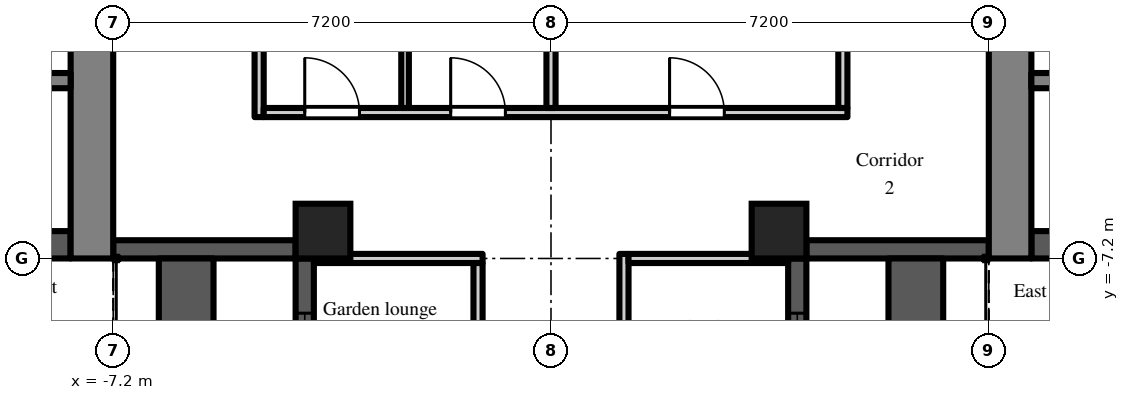
"""IFC4 building model, lengths in metres.
Left out: names, types, materials, properties, quantities, classifications, styles, units other than length and angle.
Written with IfcOpenShell. Run it as: python <this file> out.ifc"""

import sys

from ifc_helpers import new_model, si_unit, direction, frame, frame_2d, origin, origin_2d, place, context, subcontext, project, spatial, rectangle, extrude, element, fill, save


model = new_model("IFC4")
c1 = context("Model", 3, precision=1e-05, world=origin(), true_north=direction((0.0, 1.0)))
c2 = subcontext(c1, "Body", "Model", "MODEL_VIEW")
j1 = project(units=[si_unit("LENGTHUNIT", "METRE"), si_unit("PLANEANGLEUNIT", "RADIAN")], contexts=[c1])
p1 = place(None, origin())
s1 = spatial("IfcSite", under=j1, at=p1, CompositionType="ELEMENT")
p2 = place(p1, origin())
s2 = spatial("IfcBuilding", under=s1, at=p2, CompositionType="ELEMENT")
p3 = place(p2, frame((0.0, 0.0, 156.3)))
s3 = spatial("IfcBuildingStorey", under=s2, at=p3, CompositionType="ELEMENT", Elevation=156.3)
for number, where, z_axis, x_axis in (
    (1, (-3.75, -6.75, 0.0), (0.0, 0.0, 1.0), (1.0, 0.0, 0.0)),
    (2, (3.75, -6.75, 0.0), (0.0, 0.0, 1.0), (1.0, 0.0, 0.0)),
):
    element("IfcColumn", number, at=place(p3, frame(where, z_axis=z_axis, x_axis=x_axis)), inside=s3, PredefinedType="COLUMN", context=c2, shape_type="SweptSolid", body=[
        extrude(rectangle(XDim=0.9, YDim=0.9, at=origin_2d()), origin(), (0.0, 0.0, 1.0), 3.0),
    ])
p4 = place(p3, frame((-7.2, -7.05, 0.0), z_axis=(0.0, 0.0, 1.0), x_axis=(1.0, 0.0, 0.0)))
e3 = element("IfcWall", 3, at=p4, inside=s3, PredefinedType="SOLIDWALL", context=c2, shape_type="SweptSolid", body=[
    extrude(rectangle(XDim=3.0, YDim=0.3, at=frame_2d((1.5, 0.0))), origin(), (0.0, 0.0, 1.0), 2.2),
])
p5 = place(p3, frame((-4.05, -7.2, 0.0), z_axis=(0.0, 0.0, 1.0), x_axis=(0.0, -1.0, 0.0)))
e4 = element("IfcWall", 4, at=p5, inside=s3, PredefinedType="SOLIDWALL", context=c2, shape_type="SweptSolid", body=[
    extrude(rectangle(XDim=7.2, YDim=0.3, at=frame_2d((3.6, 0.0))), origin(), (0.0, 0.0, 1.0), 2.2),
])
p6 = place(p5, frame((3.0, 0.0, 0.0)))
e5 = element("IfcOpeningElement", 5, at=p6, cuts=e4, PredefinedType="OPENING", context=c2, shape_type="SweptSolid", body=[
    extrude(rectangle(XDim=1.2, YDim=2.05, at=frame_2d((0.6, 1.025))), frame((0.0, 0.16, 0.0), z_axis=(0.0, -1.0, 0.0), x_axis=(1.0, 0.0, 0.0)), (0.0, 0.0, 1.0), 0.32),
])
p7 = place(p5, frame((0.9, 0.0, 0.2)))
e6 = element("IfcOpeningElement", 6, at=p7, cuts=e4, PredefinedType="OPENING", context=c2, shape_type="SweptSolid", body=[
    extrude(rectangle(XDim=1.8, YDim=1.85, at=frame_2d((0.9, 0.925))), frame((0.0, 0.16, 0.0), z_axis=(0.0, -1.0, 0.0), x_axis=(1.0, 0.0, 0.0)), (0.0, 0.0, 1.0), 0.32),
])
p8 = place(p5, frame((4.5, 0.0, 0.2)))
e7 = element("IfcOpeningElement", 7, at=p8, cuts=e4, PredefinedType="OPENING", context=c2, shape_type="SweptSolid", body=[
    extrude(rectangle(XDim=1.8, YDim=1.85, at=frame_2d((0.9, 0.925))), frame((0.0, 0.16, 0.0), z_axis=(0.0, -1.0, 0.0), x_axis=(1.0, 0.0, 0.0)), (0.0, 0.0, 1.0), 0.32),
])
p9 = place(p3, frame((4.05, -14.4, 0.0), z_axis=(0.0, 0.0, 1.0), x_axis=(0.0, 1.0, 0.0)))
e8 = element("IfcWall", 8, at=p9, inside=s3, PredefinedType="SOLIDWALL", context=c2, shape_type="SweptSolid", body=[
    extrude(rectangle(XDim=7.2, YDim=0.3, at=frame_2d((3.6, 0.0))), origin(), (0.0, 0.0, 1.0), 2.2),
])
p10 = place(p9, frame((3.0, 0.0, 0.0)))
e9 = element("IfcOpeningElement", 9, at=p10, cuts=e8, PredefinedType="OPENING", context=c2, shape_type="SweptSolid", body=[
    extrude(rectangle(XDim=1.2, YDim=2.05, at=frame_2d((0.6, 1.025))), frame((0.0, 0.16, 0.0), z_axis=(0.0, -1.0, 0.0), x_axis=(1.0, 0.0, 0.0)), (0.0, 0.0, 1.0), 0.32),
])
p11 = place(p9, frame((0.9, 0.0, 0.2)))
e10 = element("IfcOpeningElement", 10, at=p11, cuts=e8, PredefinedType="OPENING", context=c2, shape_type="SweptSolid", body=[
    extrude(rectangle(XDim=1.8, YDim=1.85, at=frame_2d((0.9, 0.925))), frame((0.0, 0.16, 0.0), z_axis=(0.0, -1.0, 0.0), x_axis=(1.0, 0.0, 0.0)), (0.0, 0.0, 1.0), 0.32),
])
p12 = place(p9, frame((4.5, 0.0, 0.2)))
e11 = element("IfcOpeningElement", 11, at=p12, cuts=e8, PredefinedType="OPENING", context=c2, shape_type="SweptSolid", body=[
    extrude(rectangle(XDim=1.8, YDim=1.85, at=frame_2d((0.9, 0.925))), frame((0.0, 0.16, 0.0), z_axis=(0.0, -1.0, 0.0), x_axis=(1.0, 0.0, 0.0)), (0.0, 0.0, 1.0), 0.32),
])
p13 = place(p3, frame((4.2, -7.05, 0.0), z_axis=(0.0, 0.0, 1.0), x_axis=(1.0, 0.0, 0.0)))
e12 = element("IfcWall", 12, at=p13, inside=s3, PredefinedType="SOLIDWALL", context=c2, shape_type="SweptSolid", body=[
    extrude(rectangle(XDim=3.0, YDim=0.3, at=frame_2d((1.5, 0.0))), origin(), (0.0, 0.0, 1.0), 2.2),
])
for number, where, z_axis, x_axis in (
    (13, (6.0, -14.4, 0.0), (0.0, 0.0, 1.0), (0.0, 1.0, 0.0)),
    (14, (-6.0, -14.4, 0.0), (0.0, 0.0, 1.0), (0.0, 1.0, 0.0)),
):
    element("IfcWall", number, at=place(p3, frame(where, z_axis=z_axis, x_axis=x_axis)), inside=s3, PredefinedType="PARAPET", context=c2, shape_type="SweptSolid", body=[
        extrude(rectangle(XDim=7.2, YDim=0.9, at=frame_2d((3.6, 0.0))), origin(), (0.0, 0.0, 1.0), 0.8),
    ])
p14 = place(p3, frame((7.55, -7.2, 0.0), z_axis=(0.0, 0.0, 1.0), x_axis=(0.0, 1.0, 0.0)))
e15 = element("IfcWall", 15, at=p14, inside=s3, PredefinedType="SHEAR", context=c2, shape_type="SweptSolid", body=[
    extrude(rectangle(XDim=14.4, YDim=0.7, at=frame_2d((7.2, 0.0))), origin(), (0.0, 0.0, 1.0), 2.6),
])
p15 = place(p14, frame((6.0, 0.0, 0.0)))
e16 = element("IfcOpeningElement", 16, at=p15, cuts=e15, PredefinedType="OPENING", context=c2, shape_type="SweptSolid", body=[
    extrude(rectangle(XDim=2.4, YDim=2.2, at=frame_2d((1.2, 1.1))), frame((0.0, 0.36, 0.0), z_axis=(0.0, -1.0, 0.0), x_axis=(1.0, 0.0, 0.0)), (0.0, 0.0, 1.0), 0.72),
])
p16 = place(p3, frame((7.9, -6.975, 0.0), z_axis=(0.0, 0.0, 1.0), x_axis=(1.0, 0.0, 0.0)))
e17 = element("IfcWall", 17, at=p16, inside=s3, PredefinedType="SHEAR", context=c2, shape_type="SweptSolid", body=[
    extrude(rectangle(XDim=12.95, YDim=0.45, at=frame_2d((6.475, 0.0))), origin(), (0.0, 0.0, 1.0), 2.6),
])
p17 = place(p3, frame((7.9, -4.275, 0.0), z_axis=(0.0, 0.0, 1.0), x_axis=(1.0, 0.0, 0.0)))
e18 = element("IfcWall", 18, at=p17, inside=s3, PredefinedType="SHEAR", context=c2, shape_type="SweptSolid", body=[
    extrude(rectangle(XDim=1.95, YDim=0.25, at=frame_2d((0.975, 0.0))), origin(), (0.0, 0.0, 1.0), 2.6),
])
p18 = place(p3, frame((-7.55, -7.2, 0.0), z_axis=(0.0, 0.0, 1.0), x_axis=(0.0, 1.0, 0.0)))
e19 = element("IfcWall", 19, at=p18, inside=s3, PredefinedType="SHEAR", context=c2, shape_type="SweptSolid", body=[
    extrude(rectangle(XDim=14.4, YDim=0.7, at=frame_2d((7.2, 0.0))), origin(), (0.0, 0.0, 1.0), 2.6),
])
p19 = place(p18, frame((6.0, 0.0, 0.0)))
e20 = element("IfcOpeningElement", 20, at=p19, cuts=e19, PredefinedType="OPENING", context=c2, shape_type="SweptSolid", body=[
    extrude(rectangle(XDim=2.4, YDim=2.2, at=frame_2d((1.2, 1.1))), frame((0.0, 0.36, 0.0), z_axis=(0.0, -1.0, 0.0), x_axis=(1.0, 0.0, 0.0)), (0.0, 0.0, 1.0), 0.72),
])
p20 = place(p3, frame((-7.9, -6.975, 0.0), z_axis=(0.0, 0.0, 1.0), x_axis=(-1.0, 0.0, 0.0)))
e21 = element("IfcWall", 21, at=p20, inside=s3, PredefinedType="SHEAR", context=c2, shape_type="SweptSolid", body=[
    extrude(rectangle(XDim=12.95, YDim=0.45, at=frame_2d((6.475, 0.0))), origin(), (0.0, 0.0, 1.0), 2.6),
])
p21 = place(p3, frame((-7.9, -4.275, 0.0), z_axis=(0.0, 0.0, 1.0), x_axis=(-1.0, 0.0, 0.0)))
e22 = element("IfcWall", 22, at=p21, inside=s3, PredefinedType="SHEAR", context=c2, shape_type="SweptSolid", body=[
    extrude(rectangle(XDim=1.95, YDim=0.25, at=frame_2d((0.975, 0.0))), origin(), (0.0, 0.0, 1.0), 2.6),
])
p22 = place(p3, frame((-4.8, -4.875, 0.0), z_axis=(0.0, 0.0, 1.0), x_axis=(0.0, 1.0, 0.0)))
e23 = element("IfcWall", 23, at=p22, inside=s3, PredefinedType="PARTITIONING", context=c2, shape_type="SweptSolid", body=[
    extrude(rectangle(XDim=9.75, YDim=0.15, at=frame_2d((4.875, 0.0))), origin(), (0.0, 0.0, 1.0), 2.6),
])
p23 = place(p22, frame((5.575, 0.0, 0.0)))
e24 = element("IfcOpeningElement", 24, at=p23, cuts=e23, PredefinedType="OPENING", context=c2, shape_type="SweptSolid", body=[
    extrude(rectangle(XDim=1.0, YDim=2.1, at=frame_2d((0.5, 1.05))), frame((0.0, 0.085, 0.0), z_axis=(0.0, -1.0, 0.0), x_axis=(1.0, 0.0, 0.0)), (0.0, 0.0, 1.0), 0.17),
])
p24 = place(p3, frame((-4.725, -4.8, 0.0), z_axis=(0.0, 0.0, 1.0), x_axis=(1.0, 0.0, 0.0)))
e25 = element("IfcWall", 25, at=p24, inside=s3, PredefinedType="PARTITIONING", context=c2, shape_type="SweptSolid", body=[
    extrude(rectangle(XDim=9.6, YDim=0.15, at=frame_2d((4.8, 0.0))), origin(), (0.0, 0.0, 1.0), 2.6),
])
p25 = place(p24, frame((0.675, 0.0, 0.0)))
e26 = element("IfcOpeningElement", 26, at=p25, cuts=e25, PredefinedType="OPENING", context=c2, shape_type="SweptSolid", body=[
    extrude(rectangle(XDim=0.9, YDim=2.1, at=frame_2d((0.45, 1.05))), frame((0.0, 0.085, 0.0), z_axis=(0.0, -1.0, 0.0), x_axis=(1.0, 0.0, 0.0)), (0.0, 0.0, 1.0), 0.17),
])
p26 = place(p24, frame((3.075, 0.0, 0.0)))
e27 = element("IfcOpeningElement", 27, at=p26, cuts=e25, PredefinedType="OPENING", context=c2, shape_type="SweptSolid", body=[
    extrude(rectangle(XDim=0.9, YDim=2.1, at=frame_2d((0.45, 1.05))), frame((0.0, 0.085, 0.0), z_axis=(0.0, -1.0, 0.0), x_axis=(1.0, 0.0, 0.0)), (0.0, 0.0, 1.0), 0.17),
])
p27 = place(p24, frame((6.675, 0.0, 0.0)))
e28 = element("IfcOpeningElement", 28, at=p27, cuts=e25, PredefinedType="OPENING", context=c2, shape_type="SweptSolid", body=[
    extrude(rectangle(XDim=0.9, YDim=2.1, at=frame_2d((0.45, 1.05))), frame((0.0, 0.085, 0.0), z_axis=(0.0, -1.0, 0.0), x_axis=(1.0, 0.0, 0.0)), (0.0, 0.0, 1.0), 0.17),
])
p28 = place(p3, frame((-3.9, -7.2, 0.0), z_axis=(0.0, 0.0, 1.0), x_axis=(1.0, 0.0, 0.0)))
e29 = element("IfcWall", 29, at=p28, inside=s3, PredefinedType="PARTITIONING", context=c2, shape_type="SweptSolid", body=[
    extrude(rectangle(XDim=2.775, YDim=0.15, at=frame_2d((1.387, 0.0))), origin(), (0.0, 0.0, 1.0), 2.6),
])
p29 = place(p3, frame((-2.4, -4.725, 0.0), z_axis=(0.0, 0.0, 1.0), x_axis=(0.0, 1.0, 0.0)))
e30 = element("IfcWall", 30, at=p29, inside=s3, PredefinedType="PARTITIONING", context=c2, shape_type="SweptSolid", body=[
    extrude(rectangle(XDim=2.263, YDim=0.125, at=frame_2d((1.131, 0.0))), origin(), (0.0, 0.0, 1.0), 2.6),
])
p30 = place(p3, frame((-1.2, -21.3, 0.0), z_axis=(0.0, 0.0, 1.0), x_axis=(0.0, 1.0, 0.0)))
e31 = element("IfcWall", 31, at=p30, inside=s3, PredefinedType="PARTITIONING", context=c2, shape_type="SweptSolid", body=[
    extrude(rectangle(XDim=14.025, YDim=0.15, at=frame_2d((7.013, 0.0))), origin(), (0.0, 0.0, 1.0), 2.6),
])
p31 = place(p30, frame((7.85, 0.0, 0.0)))
e32 = element("IfcOpeningElement", 32, at=p31, cuts=e31, PredefinedType="OPENING", context=c2, shape_type="SweptSolid", body=[
    extrude(rectangle(XDim=0.9, YDim=2.1, at=frame_2d((0.45, 1.05))), frame((0.0, 0.085, 0.0), z_axis=(0.0, -1.0, 0.0), x_axis=(1.0, 0.0, 0.0)), (0.0, 0.0, 1.0), 0.17),
])
p32 = place(p30, frame((11.45, 0.0, 0.0)))
e33 = element("IfcOpeningElement", 33, at=p32, cuts=e31, PredefinedType="OPENING", context=c2, shape_type="SweptSolid", body=[
    extrude(rectangle(XDim=0.9, YDim=2.1, at=frame_2d((0.45, 1.05))), frame((0.0, 0.085, 0.0), z_axis=(0.0, -1.0, 0.0), x_axis=(1.0, 0.0, 0.0)), (0.0, 0.0, 1.0), 0.17),
])
p33 = place(p30, frame((2.1, 0.0, 0.0)))
e34 = element("IfcOpeningElement", 34, at=p33, cuts=e31, PredefinedType="OPENING", context=c2, shape_type="SweptSolid", body=[
    extrude(rectangle(XDim=1.0, YDim=2.1, at=frame_2d((0.5, 1.05))), frame((0.0, 0.085, 0.0), z_axis=(0.0, -1.0, 0.0), x_axis=(1.0, 0.0, 0.0)), (0.0, 0.0, 1.0), 0.17),
])
p34 = place(p3, frame((0.0, -4.725, 0.0), z_axis=(0.0, 0.0, 1.0), x_axis=(0.0, 1.0, 0.0)))
e35 = element("IfcWall", 35, at=p34, inside=s3, PredefinedType="PARTITIONING", context=c2, shape_type="SweptSolid", body=[
    extrude(rectangle(XDim=2.25, YDim=0.15, at=frame_2d((1.125, 0.0))), origin(), (0.0, 0.0, 1.0), 2.6),
])
p35 = place(p3, frame((1.2, -21.3, 0.0), z_axis=(0.0, 0.0, 1.0), x_axis=(0.0, 1.0, 0.0)))
e36 = element("IfcWall", 36, at=p35, inside=s3, PredefinedType="PARTITIONING", context=c2, shape_type="SweptSolid", body=[
    extrude(rectangle(XDim=14.175, YDim=0.15, at=frame_2d((7.087, 0.0))), origin(), (0.0, 0.0, 1.0), 2.6),
])
p36 = place(p35, frame((8.25, 0.0, 0.0)))
e37 = element("IfcOpeningElement", 37, at=p36, cuts=e36, PredefinedType="OPENING", context=c2, shape_type="SweptSolid", body=[
    extrude(rectangle(XDim=0.9, YDim=2.1, at=frame_2d((0.45, 1.05))), frame((0.0, 0.085, 0.0), z_axis=(0.0, -1.0, 0.0), x_axis=(1.0, 0.0, 0.0)), (0.0, 0.0, 1.0), 0.17),
])
p37 = place(p35, frame((0.2, 0.0, 0.0)))
e38 = element("IfcOpeningElement", 38, at=p37, cuts=e36, PredefinedType="OPENING", context=c2, shape_type="SweptSolid", body=[
    extrude(rectangle(XDim=1.0, YDim=2.1, at=frame_2d((0.5, 1.05))), frame((0.0, 0.085, 0.0), z_axis=(0.0, -1.0, 0.0), x_axis=(1.0, 0.0, 0.0)), (0.0, 0.0, 1.0), 0.17),
])
p38 = place(p3, frame((1.275, -7.2, 0.0), z_axis=(0.0, 0.0, 1.0), x_axis=(1.0, 0.0, 0.0)))
e39 = element("IfcWall", 39, at=p38, inside=s3, PredefinedType="PARTITIONING", context=c2, shape_type="SweptSolid", body=[
    extrude(rectangle(XDim=2.625, YDim=0.15, at=frame_2d((1.312, 0.0))), origin(), (0.0, 0.0, 1.0), 2.6),
])
p39 = place(p3, frame((4.8, -4.725, 0.0), z_axis=(0.0, 0.0, 1.0), x_axis=(0.0, 1.0, 0.0)))
e40 = element("IfcWall", 40, at=p39, inside=s3, PredefinedType="PARTITIONING", context=c2, shape_type="SweptSolid", body=[
    extrude(rectangle(XDim=9.45, YDim=0.15, at=frame_2d((4.725, 0.0))), origin(), (0.0, 0.0, 1.0), 2.6),
])
p40 = place(p39, frame((5.025, 0.0, 0.0)))
e41 = element("IfcOpeningElement", 41, at=p40, cuts=e40, PredefinedType="OPENING", context=c2, shape_type="SweptSolid", body=[
    extrude(rectangle(XDim=1.8, YDim=2.1, at=frame_2d((0.9, 1.05))), frame((0.0, 0.085, 0.0), z_axis=(0.0, -1.0, 0.0), x_axis=(1.0, 0.0, 0.0)), (0.0, 0.0, 1.0), 0.17),
])
p41 = place(p7, origin())
e42 = element("IfcWindow", 42, at=p41, inside=s3, PartitioningType="SINGLE_PANEL", PredefinedType="WINDOW", context=c2, shape_type="SweptSolid", body=[
    extrude(rectangle(XDim=1.8, YDim=1.85, at=frame_2d((0.9, 0.925))), frame((0.0, 0.03, 0.0), z_axis=(0.0, -1.0, 0.0), x_axis=(1.0, 0.0, 0.0)), (0.0, 0.0, 1.0), 0.06),
])
fill(e6, e42)
p42 = place(p12, origin())
e43 = element("IfcWindow", 43, at=p42, inside=s3, PartitioningType="SINGLE_PANEL", PredefinedType="WINDOW", context=c2, shape_type="SweptSolid", body=[
    extrude(rectangle(XDim=1.8, YDim=1.85, at=frame_2d((0.9, 0.925))), frame((0.0, 0.03, 0.0), z_axis=(0.0, -1.0, 0.0), x_axis=(1.0, 0.0, 0.0)), (0.0, 0.0, 1.0), 0.06),
])
fill(e11, e43)
p43 = place(p25, origin())
e44 = element("IfcDoor", 44, at=p43, inside=s3, OperationType="SINGLE_SWING_LEFT", PredefinedType="DOOR", context=c2, shape_type="SweptSolid", body=[
    extrude(rectangle(XDim=0.9, YDim=2.1, at=frame_2d((0.45, 1.05))), frame((0.0, 0.025, 0.0), z_axis=(0.0, -1.0, 0.0), x_axis=(1.0, 0.0, 0.0)), (0.0, 0.0, 1.0), 0.05),
])
fill(e26, e44)
p44 = place(p26, origin())
e45 = element("IfcDoor", 45, at=p44, inside=s3, OperationType="SINGLE_SWING_LEFT", PredefinedType="DOOR", context=c2, shape_type="SweptSolid", body=[
    extrude(rectangle(XDim=0.9, YDim=2.1, at=frame_2d((0.45, 1.05))), frame((0.0, 0.025, 0.0), z_axis=(0.0, -1.0, 0.0), x_axis=(1.0, 0.0, 0.0)), (0.0, 0.0, 1.0), 0.05),
])
fill(e27, e45)
p45 = place(p27, origin())
e46 = element("IfcDoor", 46, at=p45, inside=s3, OperationType="SINGLE_SWING_LEFT", PredefinedType="DOOR", context=c2, shape_type="SweptSolid", body=[
    extrude(rectangle(XDim=0.9, YDim=2.1, at=frame_2d((0.45, 1.05))), frame((0.0, 0.025, 0.0), z_axis=(0.0, -1.0, 0.0), x_axis=(1.0, 0.0, 0.0)), (0.0, 0.0, 1.0), 0.05),
])
fill(e28, e46)
save(model, sys.argv[1])
